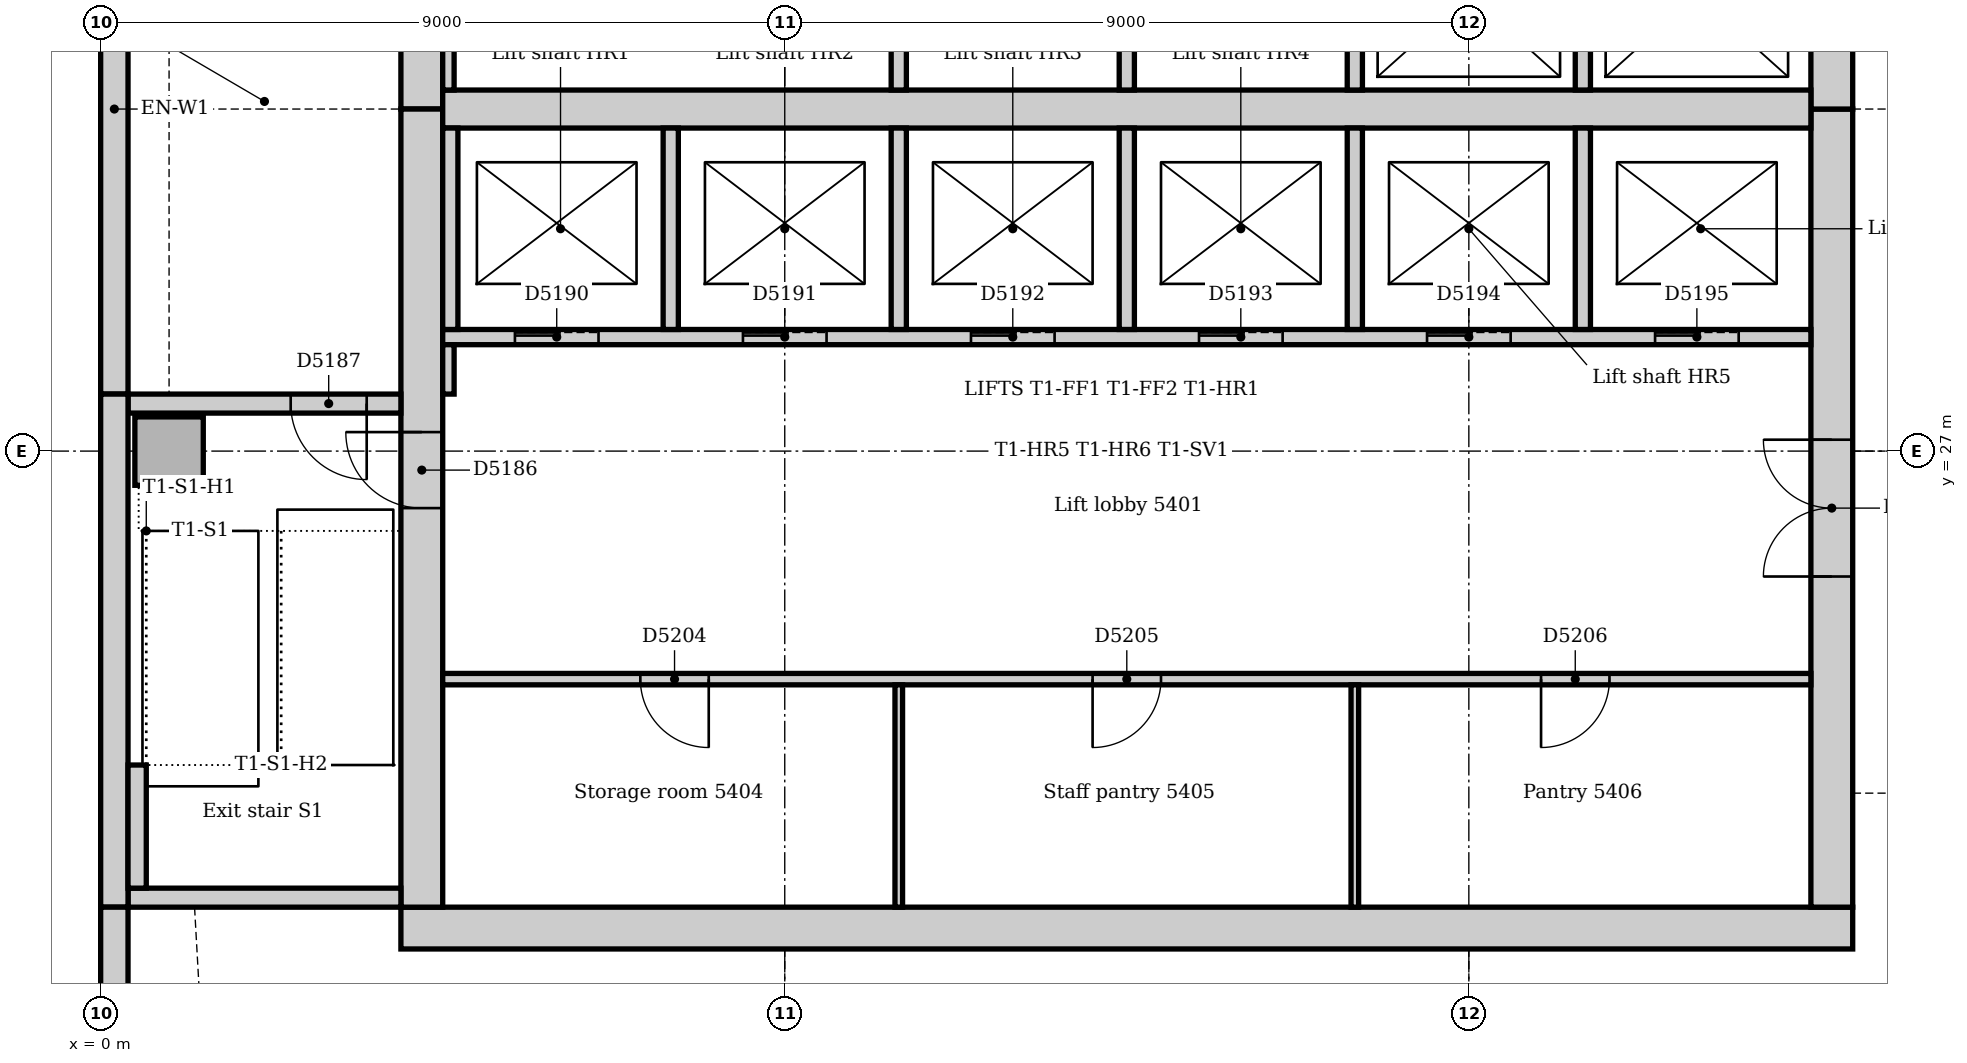
"""IFC4 building model, lengths in metres.
Left out: names, types, materials, properties, quantities, classifications, styles, units other than length and angle.
Written with IfcOpenShell. Run it as: python <this file> out.ifc"""

import sys

from ifc_helpers import new_model, si_unit, direction, frame, frame_2d, origin, origin_2d, place, context, subcontext, project, spatial, rectangle, extrude, element, fill, save


model = new_model("IFC4")
c1 = context("Model", 3, precision=1e-05, world=origin(), true_north=direction((0.0, 1.0)))
c2 = subcontext(c1, "Body", "Model", "MODEL_VIEW")
j1 = project(units=[si_unit("LENGTHUNIT", "METRE"), si_unit("PLANEANGLEUNIT", "RADIAN")], contexts=[c1])
p1 = place(None, origin())
s1 = spatial("IfcSite", under=j1, at=p1, CompositionType="ELEMENT")
p2 = place(p1, origin())
s2 = spatial("IfcBuilding", under=s1, at=p2, CompositionType="ELEMENT")
p3 = place(p2, frame((0.0, 0.0, 226.0)))
s3 = spatial("IfcBuildingStorey", under=s2, at=p3, CompositionType="ELEMENT", Elevation=226.0)
p4 = place(p3, frame((3.95, 20.725, 0.0), z_axis=(0.0, 0.0, 1.0), x_axis=(1.0, 0.0, 0.0)))
e1 = element("IfcWall", 1, at=p4, inside=s3, PredefinedType="SOLIDWALL", context=c2, shape_type="SweptSolid", body=[
    extrude(rectangle(XDim=19.1, YDim=0.55, at=frame_2d((9.55, 0.0))), origin(), (0.0, 0.0, 1.0), 4.0),
])
p5 = place(p3, frame((22.775, 21.0, 0.0), z_axis=(0.0, 0.0, 1.0), x_axis=(0.0, 1.0, 0.0)))
e2 = element("IfcWall", 2, at=p5, inside=s3, PredefinedType="SOLIDWALL", context=c2, shape_type="SweptSolid", body=[
    extrude(rectangle(XDim=10.5, YDim=0.55, at=frame_2d((5.25, 0.0))), origin(), (0.0, 0.0, 1.0), 4.0),
])
p6 = place(p5, frame((4.35, 0.0, 0.0)))
e3 = element("IfcOpeningElement", 3, at=p6, cuts=e2, PredefinedType="OPENING", context=c2, shape_type="SweptSolid", body=[
    extrude(rectangle(XDim=1.8, YDim=2.1, at=frame_2d((0.9, 1.05))), frame((0.0, 0.285, 0.0), z_axis=(0.0, -1.0, 0.0), x_axis=(1.0, 0.0, 0.0)), (0.0, 0.0, 1.0), 0.57),
])
p7 = place(p3, frame((22.775, 31.5, 0.0), z_axis=(0.0, 0.0, 1.0), x_axis=(0.0, 1.0, 0.0)))
e4 = element("IfcWall", 4, at=p7, inside=s3, PredefinedType="SOLIDWALL", context=c2, shape_type="SweptSolid", body=[
    extrude(rectangle(XDim=10.5, YDim=0.55, at=frame_2d((5.25, 0.0))), origin(), (0.0, 0.0, 1.0), 4.0),
])
p8 = place(p7, frame((3.15, 0.0, 0.0)))
e5 = element("IfcOpeningElement", 5, at=p8, cuts=e4, PredefinedType="OPENING", context=c2, shape_type="SweptSolid", body=[
    extrude(rectangle(XDim=1.0, YDim=2.1, at=frame_2d((0.5, 1.05))), frame((0.0, 0.285, 0.0), z_axis=(0.0, -1.0, 0.0), x_axis=(1.0, 0.0, 0.0)), (0.0, 0.0, 1.0), 0.57),
])
p9 = place(p7, frame((5.2, 0.0, 0.0)))
e6 = element("IfcOpeningElement", 6, at=p9, cuts=e4, PredefinedType="OPENING", context=c2, shape_type="SweptSolid", body=[
    extrude(rectangle(XDim=1.0, YDim=2.1, at=frame_2d((0.5, 1.05))), frame((0.0, 0.285, 0.0), z_axis=(0.0, -1.0, 0.0), x_axis=(1.0, 0.0, 0.0)), (0.0, 0.0, 1.0), 0.57),
])
p10 = place(p3, frame((4.225, 42.0, 0.0), z_axis=(0.0, 0.0, 1.0), x_axis=(0.0, -1.0, 0.0)))
e7 = element("IfcWall", 7, at=p10, inside=s3, PredefinedType="SOLIDWALL", context=c2, shape_type="SweptSolid", body=[
    extrude(rectangle(XDim=10.5, YDim=0.55, at=frame_2d((5.25, 0.0))), origin(), (0.0, 0.0, 1.0), 4.0),
])
p11 = place(p10, frame((5.3, 0.0, 0.0)))
e8 = element("IfcOpeningElement", 8, at=p11, cuts=e7, PredefinedType="OPENING", context=c2, shape_type="SweptSolid", body=[
    extrude(rectangle(XDim=1.0, YDim=2.1, at=frame_2d((0.5, 1.05))), frame((0.0, 0.285, 0.0), z_axis=(0.0, -1.0, 0.0), x_axis=(1.0, 0.0, 0.0)), (0.0, 0.0, 1.0), 0.57),
])
p12 = place(p3, frame((4.225, 31.5, 0.0), z_axis=(0.0, 0.0, 1.0), x_axis=(0.0, -1.0, 0.0)))
e9 = element("IfcWall", 9, at=p12, inside=s3, PredefinedType="SOLIDWALL", context=c2, shape_type="SweptSolid", body=[
    extrude(rectangle(XDim=10.5, YDim=0.55, at=frame_2d((5.25, 0.0))), origin(), (0.0, 0.0, 1.0), 4.0),
])
p13 = place(p12, frame((4.25, 0.0, 0.0)))
e10 = element("IfcOpeningElement", 10, at=p13, cuts=e9, PredefinedType="OPENING", context=c2, shape_type="SweptSolid", body=[
    extrude(rectangle(XDim=1.0, YDim=2.1, at=frame_2d((0.5, 1.05))), frame((0.0, 0.285, 0.0), z_axis=(0.0, -1.0, 0.0), x_axis=(1.0, 0.0, 0.0)), (0.0, 0.0, 1.0), 0.57),
])
p14 = place(p3, frame((4.5, 31.5, 0.0), z_axis=(0.0, 0.0, 1.0), x_axis=(1.0, 0.0, 0.0)))
e11 = element("IfcWall", 11, at=p14, inside=s3, PredefinedType="SOLIDWALL", context=c2, shape_type="SweptSolid", body=[
    extrude(rectangle(XDim=18.0, YDim=0.5, at=frame_2d((9.0, 0.0))), origin(), (0.0, 0.0, 1.0), 4.0),
])
p15 = place(p3, frame((0.36, 21.125, 0.0), z_axis=(0.0, 0.0, 1.0), x_axis=(1.0, 0.0, 0.0)))
e12 = element("IfcWall", 12, at=p15, inside=s3, PredefinedType="SOLIDWALL", context=c2, shape_type="SweptSolid", body=[
    extrude(rectangle(XDim=3.59, YDim=0.25, at=frame_2d((1.795, 0.0))), origin(), (0.0, 0.0, 1.0), 4.0),
])
p16 = place(p3, frame((3.95, 27.625, 0.0), z_axis=(0.0, 0.0, 1.0), x_axis=(-1.0, 0.0, 0.0)))
e13 = element("IfcWall", 13, at=p16, inside=s3, PredefinedType="SOLIDWALL", context=c2, shape_type="SweptSolid", body=[
    extrude(rectangle(XDim=3.59, YDim=0.25, at=frame_2d((1.795, 0.0))), origin(), (0.0, 0.0, 1.0), 4.0),
])
p17 = place(p16, frame((0.45, 0.0, 0.0)))
e14 = element("IfcOpeningElement", 14, at=p17, cuts=e13, PredefinedType="OPENING", context=c2, shape_type="SweptSolid", body=[
    extrude(rectangle(XDim=1.0, YDim=2.1, at=frame_2d((0.5, 1.05))), frame((0.0, 0.135, 0.0), z_axis=(0.0, -1.0, 0.0), x_axis=(1.0, 0.0, 0.0)), (0.0, 0.0, 1.0), 0.27),
])
p18 = place(p3, frame((0.9, 27.0, 0.0), z_axis=(0.0, 0.0, 1.0), x_axis=(1.0, 0.0, 0.0)))
e15 = element("IfcColumn", 15, at=p18, inside=s3, PredefinedType="COLUMN", context=c2, shape_type="SweptSolid", body=[
    extrude(rectangle(XDim=0.9, YDim=0.9, at=origin_2d()), origin(), (0.0, 0.0, 1.0), 4.0),
])
p19 = place(p3, frame((0.18, 35.25, 0.0), z_axis=(0.0, 0.0, 1.0), x_axis=(0.0, -1.0, 0.0)))
e16 = element("IfcWall", 16, at=p19, inside=s3, PredefinedType="STANDARD", context=c2, shape_type="SweptSolid", body=[
    extrude(rectangle(XDim=7.5, YDim=0.36, at=frame_2d((3.75, 0.0))), origin(), (0.0, 0.0, 1.0), 3.85),
])
p20 = place(p3, frame((0.18, 27.75, 0.0), z_axis=(0.0, 0.0, 1.0), x_axis=(0.0, -1.0, 0.0)))
e17 = element("IfcWall", 17, at=p20, inside=s3, PredefinedType="STANDARD", context=c2, shape_type="SweptSolid", body=[
    extrude(rectangle(XDim=6.75, YDim=0.36, at=frame_2d((3.375, 0.0))), origin(), (0.0, 0.0, 1.0), 3.85),
])
p21 = place(p3, frame((0.18, 21.0, 0.0), z_axis=(0.0, 0.0, 1.0), x_axis=(0.0, -1.0, 0.0)))
e18 = element("IfcWall", 18, at=p21, inside=s3, PredefinedType="STANDARD", context=c2, shape_type="SweptSolid", body=[
    extrude(rectangle(XDim=3.257, YDim=0.36, at=frame_2d((1.629, 0.0))), origin(), (0.0, 0.0, 1.0), 3.85),
])
p22 = place(p3, frame((0.48, 21.25, 0.0), z_axis=(0.0, 0.0, 1.0), x_axis=(0.0, 1.0, 0.0)))
e19 = element("IfcWall", 19, at=p22, inside=s3, PredefinedType="STANDARD", context=c2, shape_type="SweptSolid", body=[
    extrude(rectangle(XDim=1.62, YDim=0.24, at=frame_2d((0.81, 0.0))), origin(), (0.0, 0.0, 1.0), 4.0),
])
p23 = place(p3, frame((4.5, 28.5, 0.0), z_axis=(0.0, 0.0, 1.0), x_axis=(1.0, 0.0, 0.0)))
e20 = element("IfcWall", 20, at=p23, inside=s3, PredefinedType="PARTITIONING", context=c2, shape_type="SweptSolid", body=[
    extrude(rectangle(XDim=18.0, YDim=0.2, at=frame_2d((9.0, 0.0))), origin(), (0.0, 0.0, 1.0), 3.85),
])
p24 = place(p23, frame((0.95, 0.0, 0.0)))
e21 = element("IfcOpeningElement", 21, at=p24, cuts=e20, PredefinedType="OPENING", context=c2, shape_type="SweptSolid", body=[
    extrude(rectangle(XDim=1.1, YDim=2.1, at=frame_2d((0.55, 1.05))), frame((0.0, 0.11, 0.0), z_axis=(0.0, -1.0, 0.0), x_axis=(1.0, 0.0, 0.0)), (0.0, 0.0, 1.0), 0.22),
])
p25 = place(p23, frame((3.95, 0.0, 0.0)))
e22 = element("IfcOpeningElement", 22, at=p25, cuts=e20, PredefinedType="OPENING", context=c2, shape_type="SweptSolid", body=[
    extrude(rectangle(XDim=1.1, YDim=2.1, at=frame_2d((0.55, 1.05))), frame((0.0, 0.11, 0.0), z_axis=(0.0, -1.0, 0.0), x_axis=(1.0, 0.0, 0.0)), (0.0, 0.0, 1.0), 0.22),
])
p26 = place(p23, frame((6.95, 0.0, 0.0)))
e23 = element("IfcOpeningElement", 23, at=p26, cuts=e20, PredefinedType="OPENING", context=c2, shape_type="SweptSolid", body=[
    extrude(rectangle(XDim=1.1, YDim=2.1, at=frame_2d((0.55, 1.05))), frame((0.0, 0.11, 0.0), z_axis=(0.0, -1.0, 0.0), x_axis=(1.0, 0.0, 0.0)), (0.0, 0.0, 1.0), 0.22),
])
p27 = place(p23, frame((9.95, 0.0, 0.0)))
e24 = element("IfcOpeningElement", 24, at=p27, cuts=e20, PredefinedType="OPENING", context=c2, shape_type="SweptSolid", body=[
    extrude(rectangle(XDim=1.1, YDim=2.1, at=frame_2d((0.55, 1.05))), frame((0.0, 0.11, 0.0), z_axis=(0.0, -1.0, 0.0), x_axis=(1.0, 0.0, 0.0)), (0.0, 0.0, 1.0), 0.22),
])
p28 = place(p23, frame((12.95, 0.0, 0.0)))
e25 = element("IfcOpeningElement", 25, at=p28, cuts=e20, PredefinedType="OPENING", context=c2, shape_type="SweptSolid", body=[
    extrude(rectangle(XDim=1.1, YDim=2.1, at=frame_2d((0.55, 1.05))), frame((0.0, 0.11, 0.0), z_axis=(0.0, -1.0, 0.0), x_axis=(1.0, 0.0, 0.0)), (0.0, 0.0, 1.0), 0.22),
])
p29 = place(p23, frame((15.95, 0.0, 0.0)))
e26 = element("IfcOpeningElement", 26, at=p29, cuts=e20, PredefinedType="OPENING", context=c2, shape_type="SweptSolid", body=[
    extrude(rectangle(XDim=1.1, YDim=2.1, at=frame_2d((0.55, 1.05))), frame((0.0, 0.11, 0.0), z_axis=(0.0, -1.0, 0.0), x_axis=(1.0, 0.0, 0.0)), (0.0, 0.0, 1.0), 0.22),
])
for number, where, z_axis, x_axis in (
    (27, (10.5, 28.6, 0.0), (0.0, 0.0, 1.0), (0.0, 1.0, 0.0)),
    (28, (10.5, 31.75, 0.0), (0.0, 0.0, 1.0), (0.0, 1.0, 0.0)),
    (29, (13.5, 28.6, 0.0), (0.0, 0.0, 1.0), (0.0, 1.0, 0.0)),
    (30, (13.5, 31.75, 0.0), (0.0, 0.0, 1.0), (0.0, 1.0, 0.0)),
    (31, (16.5, 28.6, 0.0), (0.0, 0.0, 1.0), (0.0, 1.0, 0.0)),
    (32, (16.5, 31.75, 0.0), (0.0, 0.0, 1.0), (0.0, 1.0, 0.0)),
    (33, (19.5, 28.6, 0.0), (0.0, 0.0, 1.0), (0.0, 1.0, 0.0)),
    (34, (19.5, 31.75, 0.0), (0.0, 0.0, 1.0), (0.0, 1.0, 0.0)),
    (35, (4.6, 28.6, 0.0), (0.0, 0.0, 1.0), (0.0, 1.0, 0.0)),
    (36, (7.5, 28.6, 0.0), (0.0, 0.0, 1.0), (0.0, 1.0, 0.0)),
):
    element("IfcWall", number, at=place(p3, frame(where, z_axis=z_axis, x_axis=x_axis)), inside=s3, PredefinedType="PARTITIONING", context=c2, shape_type="SweptSolid", body=[
        extrude(rectangle(XDim=2.65, YDim=0.2, at=frame_2d((1.325, 0.0))), origin(), (0.0, 0.0, 1.0), 3.85),
    ])
p30 = place(p3, frame((4.5, 24.0, 0.0), z_axis=(0.0, 0.0, 1.0), x_axis=(1.0, 0.0, 0.0)))
e37 = element("IfcWall", 37, at=p30, inside=s3, PredefinedType="PARTITIONING", context=c2, shape_type="SweptSolid", body=[
    extrude(rectangle(XDim=18.0, YDim=0.15, at=frame_2d((9.0, 0.0))), origin(), (0.0, 0.0, 1.0), 3.85),
])
p31 = place(p30, frame((2.6, 0.0, 0.0)))
e38 = element("IfcOpeningElement", 38, at=p31, cuts=e37, PredefinedType="OPENING", context=c2, shape_type="SweptSolid", body=[
    extrude(rectangle(XDim=0.9, YDim=2.1, at=frame_2d((0.45, 1.05))), frame((0.0, 0.085, 0.0), z_axis=(0.0, -1.0, 0.0), x_axis=(1.0, 0.0, 0.0)), (0.0, 0.0, 1.0), 0.17),
])
p32 = place(p30, frame((8.55, 0.0, 0.0)))
e39 = element("IfcOpeningElement", 39, at=p32, cuts=e37, PredefinedType="OPENING", context=c2, shape_type="SweptSolid", body=[
    extrude(rectangle(XDim=0.9, YDim=2.1, at=frame_2d((0.45, 1.05))), frame((0.0, 0.085, 0.0), z_axis=(0.0, -1.0, 0.0), x_axis=(1.0, 0.0, 0.0)), (0.0, 0.0, 1.0), 0.17),
])
p33 = place(p30, frame((14.45, 0.0, 0.0)))
e40 = element("IfcOpeningElement", 40, at=p33, cuts=e37, PredefinedType="OPENING", context=c2, shape_type="SweptSolid", body=[
    extrude(rectangle(XDim=0.9, YDim=2.1, at=frame_2d((0.45, 1.05))), frame((0.0, 0.085, 0.0), z_axis=(0.0, -1.0, 0.0), x_axis=(1.0, 0.0, 0.0)), (0.0, 0.0, 1.0), 0.17),
])
p34 = place(p3, frame((4.575, 31.75, 0.0), z_axis=(0.0, 0.0, 1.0), x_axis=(0.0, 1.0, 0.0)))
e41 = element("IfcWall", 41, at=p34, inside=s3, PredefinedType="PARTITIONING", context=c2, shape_type="SweptSolid", body=[
    extrude(rectangle(XDim=2.675, YDim=0.15, at=frame_2d((1.337, 0.0))), origin(), (0.0, 0.0, 1.0), 3.85),
])
p35 = place(p3, frame((4.575, 27.75, 0.0), z_axis=(0.0, 0.0, 1.0), x_axis=(0.0, 1.0, 0.0)))
e42 = element("IfcWall", 42, at=p35, inside=s3, PredefinedType="PARTITIONING", context=c2, shape_type="SweptSolid", body=[
    extrude(rectangle(XDim=0.65, YDim=0.15, at=frame_2d((0.325, 0.0))), origin(), (0.0, 0.0, 1.0), 3.85),
])
for number, where, z_axis, x_axis in (
    (43, (10.5, 21.0, 0.0), (0.0, 0.0, 1.0), (0.0, 1.0, 0.0)),
    (44, (16.5, 21.0, 0.0), (0.0, 0.0, 1.0), (0.0, 1.0, 0.0)),
):
    element("IfcWall", number, at=place(p3, frame(where, z_axis=z_axis, x_axis=x_axis)), inside=s3, PredefinedType="PARTITIONING", context=c2, shape_type="SweptSolid", body=[
        extrude(rectangle(XDim=2.925, YDim=0.1, at=frame_2d((1.462, 0.0))), origin(), (0.0, 0.0, 1.0), 3.85),
    ])
p36 = place(p13, frame((1.0, 0.0, 0.0), z_axis=(0.0, 0.0, 1.0), x_axis=(-1.0, 0.0, 0.0)))
e45 = element("IfcDoor", 45, at=p36, inside=s3, OperationType="SINGLE_SWING_RIGHT", PredefinedType="DOOR", context=c2, shape_type="SweptSolid", body=[
    extrude(rectangle(XDim=1.0, YDim=2.1, at=frame_2d((0.5, 1.05))), frame((0.0, 0.025, 0.0), z_axis=(0.0, -1.0, 0.0), x_axis=(1.0, 0.0, 0.0)), (0.0, 0.0, 1.0), 0.05),
])
fill(e10, e45)
p37 = place(p17, origin())
e46 = element("IfcDoor", 46, at=p37, inside=s3, OperationType="SINGLE_SWING_LEFT", PredefinedType="DOOR", context=c2, shape_type="SweptSolid", body=[
    extrude(rectangle(XDim=1.0, YDim=2.1, at=frame_2d((0.5, 1.05))), frame((0.0, 0.025, 0.0), z_axis=(0.0, -1.0, 0.0), x_axis=(1.0, 0.0, 0.0)), (0.0, 0.0, 1.0), 0.05),
])
fill(e14, e46)
p38 = place(p24, origin())
e47 = element("IfcDoor", 47, at=p38, inside=s3, OperationType="SLIDING_TO_LEFT", PredefinedType="DOOR", context=c2, shape_type="SweptSolid", body=[
    extrude(rectangle(XDim=1.1, YDim=2.1, at=frame_2d((0.55, 1.05))), frame((0.0, 0.025, 0.0), z_axis=(0.0, -1.0, 0.0), x_axis=(1.0, 0.0, 0.0)), (0.0, 0.0, 1.0), 0.05),
])
fill(e21, e47)
p39 = place(p25, origin())
e48 = element("IfcDoor", 48, at=p39, inside=s3, OperationType="SLIDING_TO_LEFT", PredefinedType="DOOR", context=c2, shape_type="SweptSolid", body=[
    extrude(rectangle(XDim=1.1, YDim=2.1, at=frame_2d((0.55, 1.05))), frame((0.0, 0.025, 0.0), z_axis=(0.0, -1.0, 0.0), x_axis=(1.0, 0.0, 0.0)), (0.0, 0.0, 1.0), 0.05),
])
fill(e22, e48)
p40 = place(p26, origin())
e49 = element("IfcDoor", 49, at=p40, inside=s3, OperationType="SLIDING_TO_LEFT", PredefinedType="DOOR", context=c2, shape_type="SweptSolid", body=[
    extrude(rectangle(XDim=1.1, YDim=2.1, at=frame_2d((0.55, 1.05))), frame((0.0, 0.025, 0.0), z_axis=(0.0, -1.0, 0.0), x_axis=(1.0, 0.0, 0.0)), (0.0, 0.0, 1.0), 0.05),
])
fill(e23, e49)
p41 = place(p27, origin())
e50 = element("IfcDoor", 50, at=p41, inside=s3, OperationType="SLIDING_TO_LEFT", PredefinedType="DOOR", context=c2, shape_type="SweptSolid", body=[
    extrude(rectangle(XDim=1.1, YDim=2.1, at=frame_2d((0.55, 1.05))), frame((0.0, 0.025, 0.0), z_axis=(0.0, -1.0, 0.0), x_axis=(1.0, 0.0, 0.0)), (0.0, 0.0, 1.0), 0.05),
])
fill(e24, e50)
p42 = place(p28, origin())
e51 = element("IfcDoor", 51, at=p42, inside=s3, OperationType="SLIDING_TO_LEFT", PredefinedType="DOOR", context=c2, shape_type="SweptSolid", body=[
    extrude(rectangle(XDim=1.1, YDim=2.1, at=frame_2d((0.55, 1.05))), frame((0.0, 0.025, 0.0), z_axis=(0.0, -1.0, 0.0), x_axis=(1.0, 0.0, 0.0)), (0.0, 0.0, 1.0), 0.05),
])
fill(e25, e51)
p43 = place(p29, origin())
e52 = element("IfcDoor", 52, at=p43, inside=s3, OperationType="SLIDING_TO_LEFT", PredefinedType="DOOR", context=c2, shape_type="SweptSolid", body=[
    extrude(rectangle(XDim=1.1, YDim=2.1, at=frame_2d((0.55, 1.05))), frame((0.0, 0.025, 0.0), z_axis=(0.0, -1.0, 0.0), x_axis=(1.0, 0.0, 0.0)), (0.0, 0.0, 1.0), 0.05),
])
fill(e26, e52)
p44 = place(p6, origin())
e53 = element("IfcDoor", 53, at=p44, inside=s3, OperationType="DOUBLE_DOOR_DOUBLE_SWING", PredefinedType="DOOR", context=c2, shape_type="SweptSolid", body=[
    extrude(rectangle(XDim=1.8, YDim=2.1, at=frame_2d((0.9, 1.05))), frame((0.0, 0.025, 0.0), z_axis=(0.0, -1.0, 0.0), x_axis=(1.0, 0.0, 0.0)), (0.0, 0.0, 1.0), 0.05),
])
fill(e3, e53)
p45 = place(p31, frame((0.9, 0.0, 0.0), z_axis=(0.0, 0.0, 1.0), x_axis=(-1.0, 0.0, 0.0)))
e54 = element("IfcDoor", 54, at=p45, inside=s3, OperationType="SINGLE_SWING_LEFT", PredefinedType="DOOR", context=c2, shape_type="SweptSolid", body=[
    extrude(rectangle(XDim=0.9, YDim=2.1, at=frame_2d((0.45, 1.05))), frame((0.0, 0.025, 0.0), z_axis=(0.0, -1.0, 0.0), x_axis=(1.0, 0.0, 0.0)), (0.0, 0.0, 1.0), 0.05),
])
fill(e38, e54)
p46 = place(p32, frame((0.9, 0.0, 0.0), z_axis=(0.0, 0.0, 1.0), x_axis=(-1.0, 0.0, 0.0)))
e55 = element("IfcDoor", 55, at=p46, inside=s3, OperationType="SINGLE_SWING_RIGHT", PredefinedType="DOOR", context=c2, shape_type="SweptSolid", body=[
    extrude(rectangle(XDim=0.9, YDim=2.1, at=frame_2d((0.45, 1.05))), frame((0.0, 0.025, 0.0), z_axis=(0.0, -1.0, 0.0), x_axis=(1.0, 0.0, 0.0)), (0.0, 0.0, 1.0), 0.05),
])
fill(e39, e55)
p47 = place(p33, frame((0.9, 0.0, 0.0), z_axis=(0.0, 0.0, 1.0), x_axis=(-1.0, 0.0, 0.0)))
e56 = element("IfcDoor", 56, at=p47, inside=s3, OperationType="SINGLE_SWING_RIGHT", PredefinedType="DOOR", context=c2, shape_type="SweptSolid", body=[
    extrude(rectangle(XDim=0.9, YDim=2.1, at=frame_2d((0.45, 1.05))), frame((0.0, 0.025, 0.0), z_axis=(0.0, -1.0, 0.0), x_axis=(1.0, 0.0, 0.0)), (0.0, 0.0, 1.0), 0.05),
])
fill(e40, e56)
save(model, sys.argv[1])
